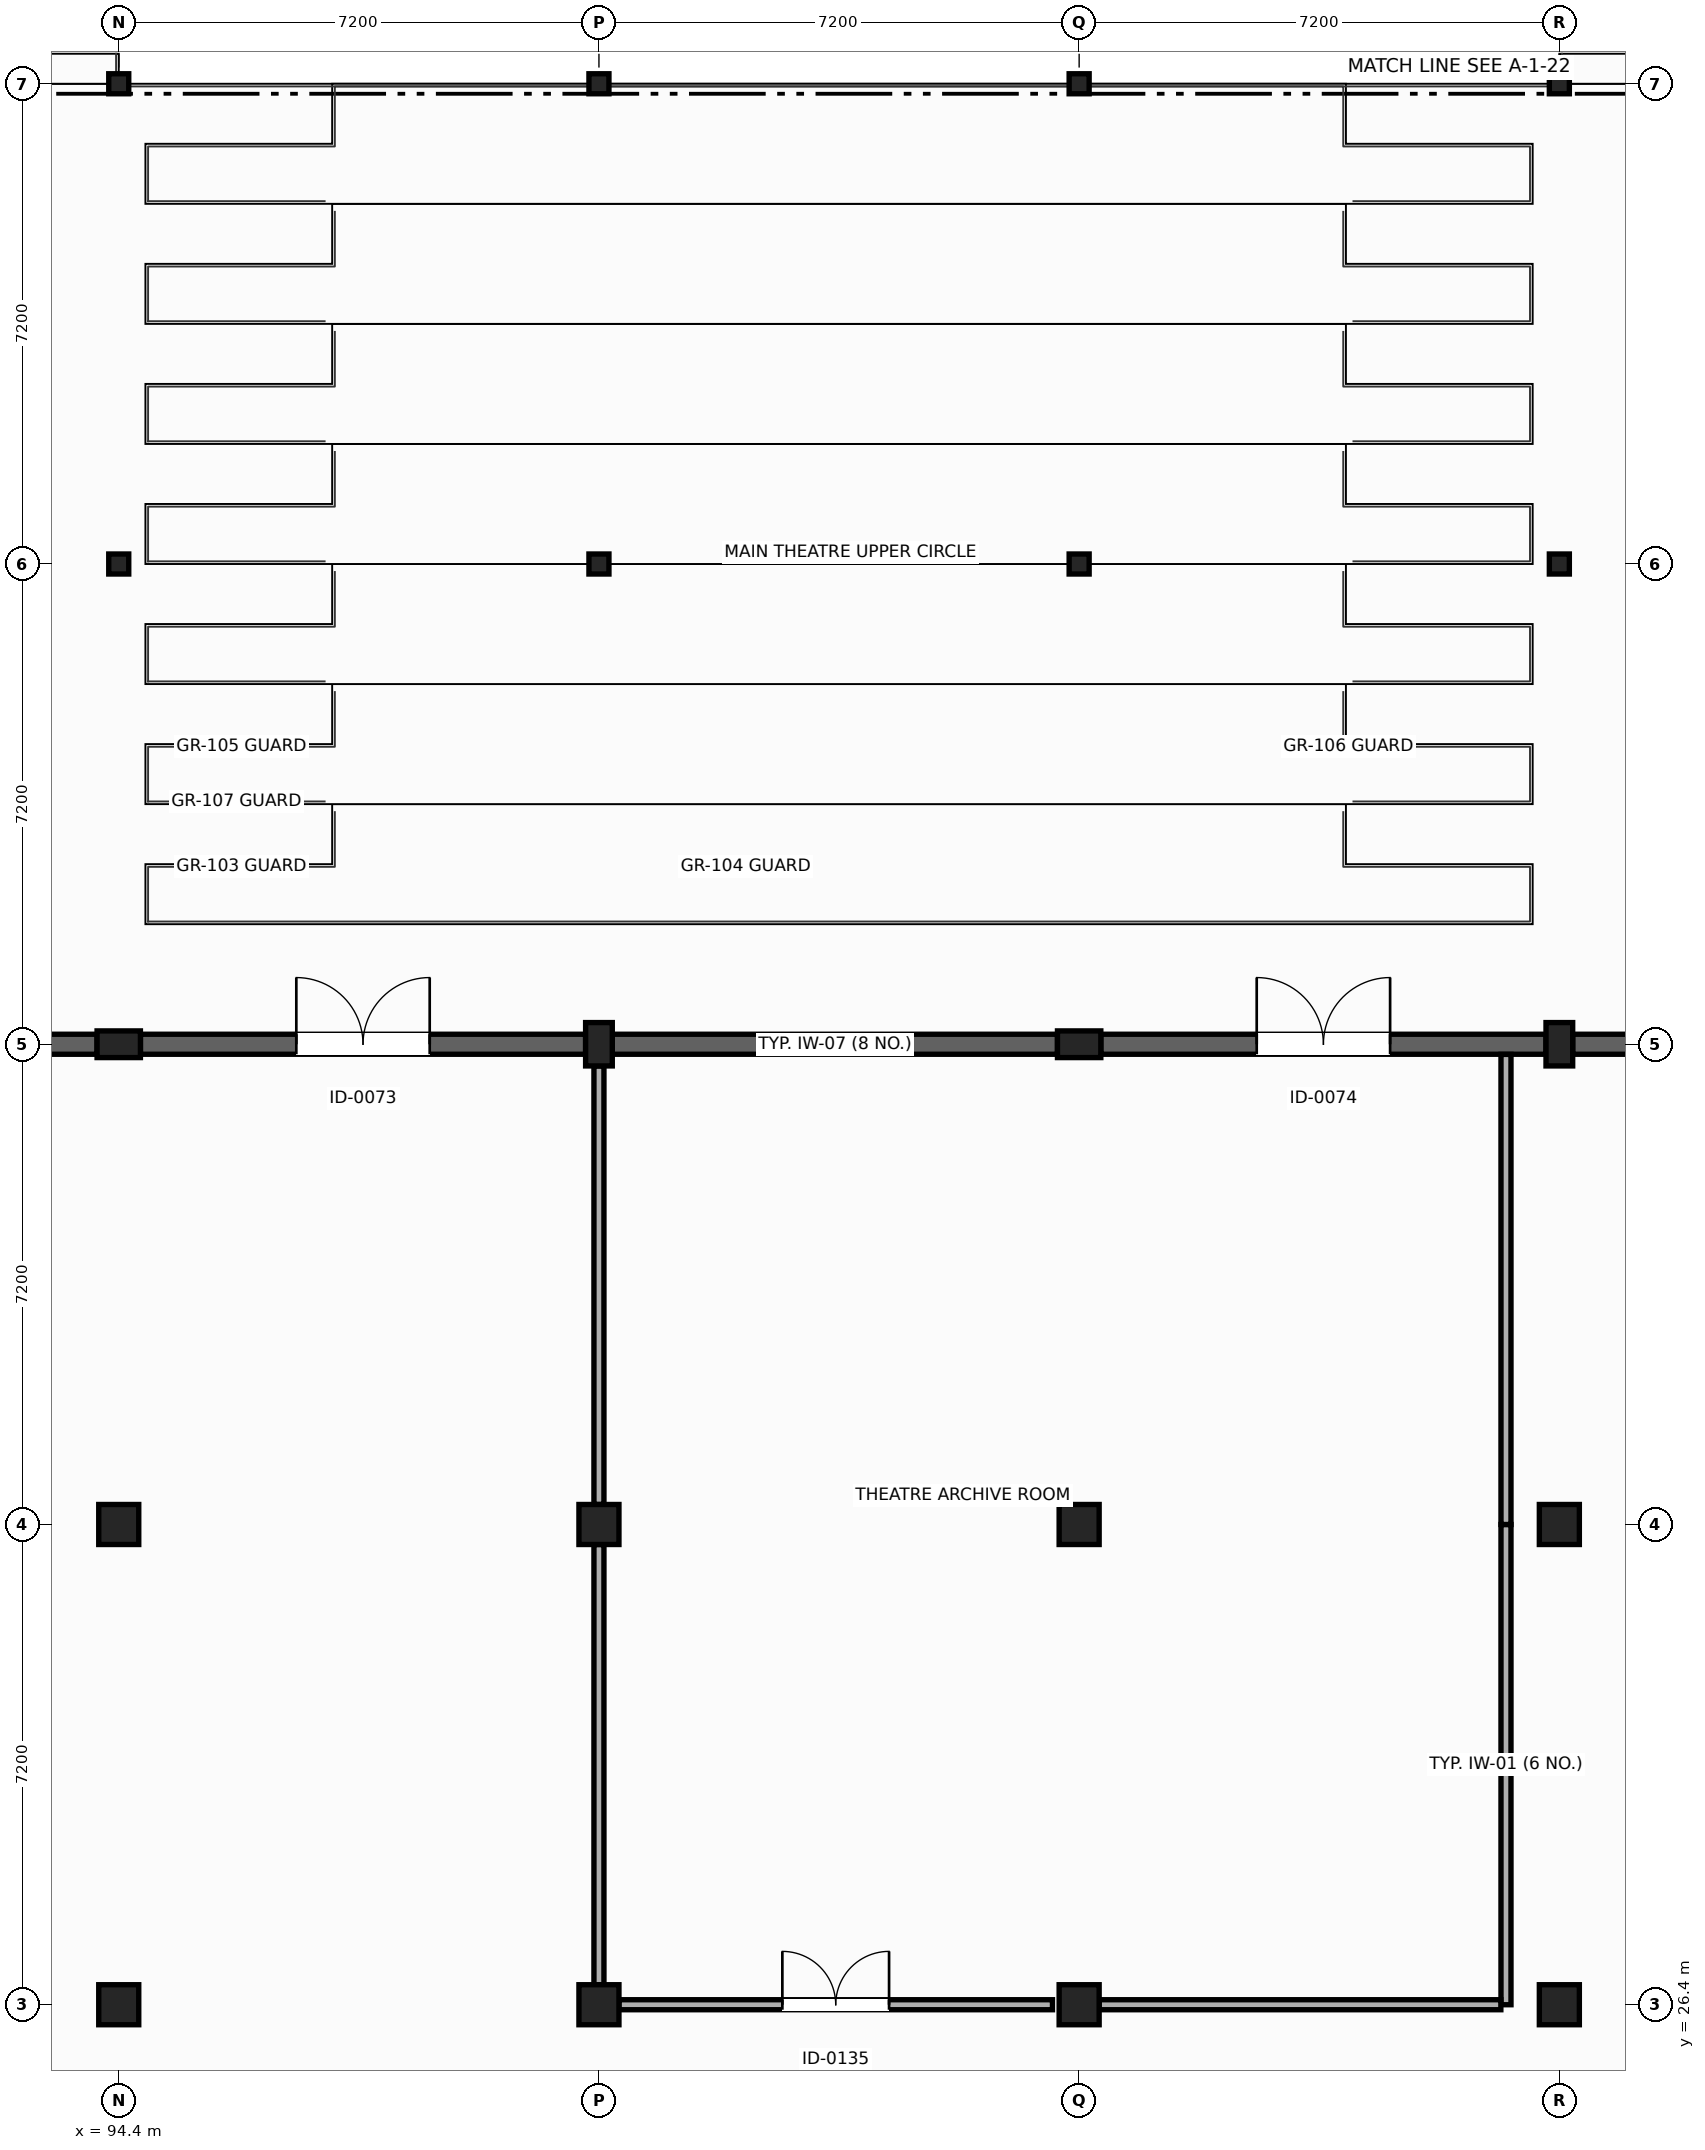
"""IFC4 building model, lengths in metres.
Left out: names, types, materials, properties, quantities, classifications, styles, units other than length and angle.
Written with IfcOpenShell. Run it as: python <this file> out.ifc"""

import sys

from ifc_helpers import new_model, si_unit, direction, frame, frame_2d, origin, origin_2d, place, context, subcontext, project, spatial, rectangle, i_section, extrude, element, fill, save


model = new_model("IFC4")
c1 = context("Model", 3, precision=1e-05, world=origin(), true_north=direction((0.0, 1.0)))
c2 = subcontext(c1, "Body", "Model", "MODEL_VIEW")
j1 = project(units=[si_unit("LENGTHUNIT", "METRE"), si_unit("PLANEANGLEUNIT", "RADIAN")], contexts=[c1])
p1 = place(None, origin())
s1 = spatial("IfcSite", under=j1, at=p1, CompositionType="ELEMENT")
p2 = place(p1, origin())
s2 = spatial("IfcBuilding", under=s1, at=p2, CompositionType="ELEMENT")
p3 = place(p2, frame((0.0, 0.0, 9.9)))
s3 = spatial("IfcBuildingStorey", under=s2, at=p3, CompositionType="ELEMENT", Elevation=9.9)
p4 = place(p3, frame((94.4, 48.0, 0.0), z_axis=(0.0, 0.0, 1.0), x_axis=(1.0, 0.0, 0.0)))
e1 = element("IfcColumn", 1, at=p4, inside=s3, PredefinedType="COLUMN", context=c2, shape_type="SweptSolid", body=[
    extrude(i_section(OverallWidth=0.3, OverallDepth=0.3, WebThickness=0.011, FlangeThickness=0.019, at=origin_2d()), origin(), (0.0, 0.0, 1.0), 1.145),
])
p5 = place(p3, frame((94.4, 55.2, 0.0), z_axis=(0.0, 0.0, 1.0), x_axis=(1.0, 0.0, 0.0)))
e2 = element("IfcColumn", 2, at=p5, inside=s3, PredefinedType="COLUMN", context=c2, shape_type="SweptSolid", body=[
    extrude(i_section(OverallWidth=0.3, OverallDepth=0.3, WebThickness=0.011, FlangeThickness=0.019, at=origin_2d()), origin(), (0.0, 0.0, 1.0), 1.945),
])
p6 = place(p3, frame((101.6, 48.0, 0.0), z_axis=(0.0, 0.0, 1.0), x_axis=(1.0, 0.0, 0.0)))
e3 = element("IfcColumn", 3, at=p6, inside=s3, PredefinedType="COLUMN", context=c2, shape_type="SweptSolid", body=[
    extrude(i_section(OverallWidth=0.3, OverallDepth=0.3, WebThickness=0.011, FlangeThickness=0.019, at=origin_2d()), origin(), (0.0, 0.0, 1.0), 1.145),
])
p7 = place(p3, frame((101.6, 55.2, 0.0), z_axis=(0.0, 0.0, 1.0), x_axis=(1.0, 0.0, 0.0)))
e4 = element("IfcColumn", 4, at=p7, inside=s3, PredefinedType="COLUMN", context=c2, shape_type="SweptSolid", body=[
    extrude(i_section(OverallWidth=0.3, OverallDepth=0.3, WebThickness=0.011, FlangeThickness=0.019, at=origin_2d()), origin(), (0.0, 0.0, 1.0), 1.945),
])
p8 = place(p3, frame((108.8, 48.0, 0.0), z_axis=(0.0, 0.0, 1.0), x_axis=(1.0, 0.0, 0.0)))
e5 = element("IfcColumn", 5, at=p8, inside=s3, PredefinedType="COLUMN", context=c2, shape_type="SweptSolid", body=[
    extrude(i_section(OverallWidth=0.3, OverallDepth=0.3, WebThickness=0.011, FlangeThickness=0.019, at=origin_2d()), origin(), (0.0, 0.0, 1.0), 1.145),
])
p9 = place(p3, frame((108.8, 55.2, 0.0), z_axis=(0.0, 0.0, 1.0), x_axis=(1.0, 0.0, 0.0)))
e6 = element("IfcColumn", 6, at=p9, inside=s3, PredefinedType="COLUMN", context=c2, shape_type="SweptSolid", body=[
    extrude(i_section(OverallWidth=0.3, OverallDepth=0.3, WebThickness=0.011, FlangeThickness=0.019, at=origin_2d()), origin(), (0.0, 0.0, 1.0), 1.945),
])
p10 = place(p3, frame((116.0, 48.0, 0.0), z_axis=(0.0, 0.0, 1.0), x_axis=(1.0, 0.0, 0.0)))
e7 = element("IfcColumn", 7, at=p10, inside=s3, PredefinedType="COLUMN", context=c2, shape_type="SweptSolid", body=[
    extrude(i_section(OverallWidth=0.3, OverallDepth=0.3, WebThickness=0.011, FlangeThickness=0.019, at=origin_2d()), origin(), (0.0, 0.0, 1.0), 1.145),
])
p11 = place(p3, frame((116.0, 55.2, 0.0), z_axis=(0.0, 0.0, 1.0), x_axis=(1.0, 0.0, 0.0)))
e8 = element("IfcColumn", 8, at=p11, inside=s3, PredefinedType="COLUMN", context=c2, shape_type="SweptSolid", body=[
    extrude(i_section(OverallWidth=0.3, OverallDepth=0.3, WebThickness=0.011, FlangeThickness=0.019, at=origin_2d()), origin(), (0.0, 0.0, 1.0), 1.945),
])
for number, where, z_axis, x_axis in (
    (9, (94.4, 26.4, 0.0), (0.0, 0.0, 1.0), (1.0, 0.0, 0.0)),
    (10, (101.6, 26.4, 0.0), (0.0, 0.0, 1.0), (1.0, 0.0, 0.0)),
    (11, (108.8, 26.4, 0.0), (0.0, 0.0, 1.0), (0.0, 1.0, 0.0)),
    (12, (116.0, 26.4, 0.0), (0.0, 0.0, 1.0), (1.0, 0.0, 0.0)),
    (13, (94.4, 33.6, 0.0), (0.0, 0.0, 1.0), (1.0, 0.0, 0.0)),
    (14, (101.6, 33.6, 0.0), (0.0, 0.0, 1.0), (0.0, 1.0, 0.0)),
    (15, (108.8, 33.6, 0.0), (0.0, 0.0, 1.0), (1.0, 0.0, 0.0)),
    (16, (116.0, 33.6, 0.0), (0.0, 0.0, 1.0), (0.0, 1.0, 0.0)),
):
    element("IfcColumn", number, at=place(p3, frame(where, z_axis=z_axis, x_axis=x_axis)), inside=s3, PredefinedType="COLUMN", context=c2, shape_type="SweptSolid", body=[
        extrude(rectangle(XDim=0.6, YDim=0.6, at=origin_2d()), origin(), (0.0, 0.0, 1.0), 4.5),
    ])
for number, where, z_axis, x_axis in (
    (17, (94.4, 40.8, 0.0), (0.0, 0.0, 1.0), (0.0, 1.0, 0.0)),
    (18, (101.6, 40.8, 0.0), (0.0, 0.0, 1.0), (1.0, 0.0, 0.0)),
    (19, (108.8, 40.8, 0.0), (0.0, 0.0, 1.0), (0.0, 1.0, 0.0)),
    (20, (116.0, 40.8, 0.0), (0.0, 0.0, 1.0), (1.0, 0.0, 0.0)),
):
    element("IfcColumn", number, at=place(p3, frame(where, z_axis=z_axis, x_axis=x_axis)), inside=s3, PredefinedType="PILASTER", context=c2, shape_type="SweptSolid", body=[
        extrude(rectangle(XDim=0.4, YDim=0.65, at=origin_2d()), origin(), (0.0, 0.0, 1.0), 4.5),
    ])
p12 = place(p3, frame((87.4, 40.8, 0.0), z_axis=(0.0, 0.0, 1.0), x_axis=(1.0, 0.0, 0.0)))
e21 = element("IfcWall", 21, at=p12, inside=s3, PredefinedType="SHEAR", context=c2, shape_type="SweptSolid", body=[
    extrude(rectangle(XDim=6.675, YDim=0.3, at=frame_2d((3.337, 0.0))), origin(), (0.0, 0.0, 1.0), 4.22),
])
p13 = place(p12, frame((2.438, 0.0, 0.0)))
e22 = element("IfcOpeningElement", 22, at=p13, cuts=e21, PredefinedType="OPENING", context=c2, shape_type="SweptSolid", body=[
    extrude(rectangle(XDim=1.8, YDim=2.3, at=frame_2d((0.9, 1.15))), frame((0.0, 0.16, 0.0), z_axis=(0.0, -1.0, 0.0), x_axis=(1.0, 0.0, 0.0)), (0.0, 0.0, 1.0), 0.32),
])
p14 = place(p3, frame((94.725, 40.8, 0.0), z_axis=(0.0, 0.0, 1.0), x_axis=(1.0, 0.0, 0.0)))
e23 = element("IfcWall", 23, at=p14, inside=s3, PredefinedType="SHEAR", context=c2, shape_type="SweptSolid", body=[
    extrude(rectangle(XDim=6.675, YDim=0.3, at=frame_2d((3.337, 0.0))), origin(), (0.0, 0.0, 1.0), 4.22),
])
p15 = place(p14, frame((2.337, 0.0, 0.0)))
e24 = element("IfcOpeningElement", 24, at=p15, cuts=e23, PredefinedType="OPENING", context=c2, shape_type="SweptSolid", body=[
    extrude(rectangle(XDim=2.0, YDim=2.35, at=frame_2d((1.0, 1.175))), frame((0.0, 0.16, 0.0), z_axis=(0.0, -1.0, 0.0), x_axis=(1.0, 0.0, 0.0)), (0.0, 0.0, 1.0), 0.32),
])
p16 = place(p3, frame((101.8, 40.8, 0.0), z_axis=(0.0, 0.0, 1.0), x_axis=(1.0, 0.0, 0.0)))
e25 = element("IfcWall", 25, at=p16, inside=s3, PredefinedType="SHEAR", context=c2, shape_type="SweptSolid", body=[
    extrude(rectangle(XDim=6.675, YDim=0.3, at=frame_2d((3.337, 0.0))), origin(), (0.0, 0.0, 1.0), 4.22),
])
p17 = place(p3, frame((109.125, 40.8, 0.0), z_axis=(0.0, 0.0, 1.0), x_axis=(1.0, 0.0, 0.0)))
e26 = element("IfcWall", 26, at=p17, inside=s3, PredefinedType="SHEAR", context=c2, shape_type="SweptSolid", body=[
    extrude(rectangle(XDim=6.675, YDim=0.3, at=frame_2d((3.337, 0.0))), origin(), (0.0, 0.0, 1.0), 4.22),
])
p18 = place(p17, frame((2.337, 0.0, 0.0)))
e27 = element("IfcOpeningElement", 27, at=p18, cuts=e26, PredefinedType="OPENING", context=c2, shape_type="SweptSolid", body=[
    extrude(rectangle(XDim=2.0, YDim=2.35, at=frame_2d((1.0, 1.175))), frame((0.0, 0.16, 0.0), z_axis=(0.0, -1.0, 0.0), x_axis=(1.0, 0.0, 0.0)), (0.0, 0.0, 1.0), 0.32),
])
p19 = place(p3, frame((116.2, 40.8, 0.0), z_axis=(0.0, 0.0, 1.0), x_axis=(1.0, 0.0, 0.0)))
e28 = element("IfcWall", 28, at=p19, inside=s3, PredefinedType="SHEAR", context=c2, shape_type="SweptSolid", body=[
    extrude(rectangle(XDim=6.8, YDim=0.3, at=frame_2d((3.4, 0.0))), origin(), (0.0, 0.0, 1.0), 4.22),
])
p20 = place(p19, frame((2.5, 0.0, 0.0)))
e29 = element("IfcOpeningElement", 29, at=p20, cuts=e28, PredefinedType="OPENING", context=c2, shape_type="SweptSolid", body=[
    extrude(rectangle(XDim=1.8, YDim=2.3, at=frame_2d((0.9, 1.15))), frame((0.0, 0.16, 0.0), z_axis=(0.0, -1.0, 0.0), x_axis=(1.0, 0.0, 0.0)), (0.0, 0.0, 1.0), 0.32),
])
p21 = place(p3, frame((115.2, 26.4, 0.0), z_axis=(0.0, 0.0, 1.0), x_axis=(0.0, 1.0, 0.0)))
e30 = element("IfcWall", 30, at=p21, inside=s3, PredefinedType="PARTITIONING", context=c2, shape_type="SweptSolid", body=[
    extrude(rectangle(XDim=7.2, YDim=0.15, at=frame_2d((3.6, 0.0))), origin(), (0.0, 0.0, 1.0), 3.715),
])
p22 = place(p3, frame((115.2, 33.6, 0.0), z_axis=(0.0, 0.0, 1.0), x_axis=(0.0, 1.0, 0.0)))
e31 = element("IfcWall", 31, at=p22, inside=s3, PredefinedType="PARTITIONING", context=c2, shape_type="SweptSolid", body=[
    extrude(rectangle(XDim=7.048, YDim=0.15, at=frame_2d((3.524, 0.0))), origin(), (0.0, 0.0, 1.0), 3.715),
])
p23 = place(p3, frame((101.6, 40.475, 0.0), z_axis=(0.0, 0.0, 1.0), x_axis=(0.0, -1.0, 0.0)))
e32 = element("IfcWall", 32, at=p23, inside=s3, PredefinedType="PARTITIONING", context=c2, shape_type="SweptSolid", body=[
    extrude(rectangle(XDim=6.575, YDim=0.15, at=frame_2d((3.288, 0.0))), origin(), (0.0, 0.0, 1.0), 3.515),
])
p24 = place(p3, frame((101.6, 33.3, 0.0), z_axis=(0.0, 0.0, 1.0), x_axis=(0.0, -1.0, 0.0)))
e33 = element("IfcWall", 33, at=p24, inside=s3, PredefinedType="PARTITIONING", context=c2, shape_type="SweptSolid", body=[
    extrude(rectangle(XDim=6.6, YDim=0.15, at=frame_2d((3.3, 0.0))), origin(), (0.0, 0.0, 1.0), 3.515),
])
p25 = place(p3, frame((101.9, 26.4, 0.0), z_axis=(0.0, 0.0, 1.0), x_axis=(1.0, 0.0, 0.0)))
e34 = element("IfcWall", 34, at=p25, inside=s3, PredefinedType="PARTITIONING", context=c2, shape_type="SweptSolid", body=[
    extrude(rectangle(XDim=6.5, YDim=0.15, at=frame_2d((3.25, 0.0))), origin(), (0.0, 0.0, 1.0), 3.715),
])
p26 = place(p25, frame((2.45, 0.0, 0.0)))
e35 = element("IfcOpeningElement", 35, at=p26, cuts=e34, PredefinedType="OPENING", context=c2, shape_type="SweptSolid", body=[
    extrude(rectangle(XDim=1.6, YDim=2.25, at=frame_2d((0.8, 1.125))), frame((0.0, 0.085, 0.0), z_axis=(0.0, -1.0, 0.0), x_axis=(1.0, 0.0, 0.0)), (0.0, 0.0, 1.0), 0.17),
])
p27 = place(p3, frame((109.1, 26.4, 0.0), z_axis=(0.0, 0.0, 1.0), x_axis=(1.0, 0.0, 0.0)))
e36 = element("IfcWall", 36, at=p27, inside=s3, PredefinedType="PARTITIONING", context=c2, shape_type="SweptSolid", body=[
    extrude(rectangle(XDim=6.023, YDim=0.15, at=frame_2d((3.011, 0.0))), origin(), (0.0, 0.0, 1.0), 3.715),
])
p28 = place(p15, origin())
e37 = element("IfcDoor", 37, at=p28, inside=s3, OperationType="DOUBLE_DOOR_SINGLE_SWING", PredefinedType="DOOR", context=c2, shape_type="SweptSolid", body=[
    extrude(rectangle(XDim=2.0, YDim=2.35, at=frame_2d((1.0, 1.175))), frame((0.0, 0.025, 0.0), z_axis=(0.0, -1.0, 0.0), x_axis=(1.0, 0.0, 0.0)), (0.0, 0.0, 1.0), 0.05),
])
fill(e24, e37)
p29 = place(p18, origin())
e38 = element("IfcDoor", 38, at=p29, inside=s3, OperationType="DOUBLE_DOOR_SINGLE_SWING", PredefinedType="DOOR", context=c2, shape_type="SweptSolid", body=[
    extrude(rectangle(XDim=2.0, YDim=2.35, at=frame_2d((1.0, 1.175))), frame((0.0, 0.025, 0.0), z_axis=(0.0, -1.0, 0.0), x_axis=(1.0, 0.0, 0.0)), (0.0, 0.0, 1.0), 0.05),
])
fill(e27, e38)
p30 = place(p26, origin())
e39 = element("IfcDoor", 39, at=p30, inside=s3, OperationType="DOUBLE_DOOR_SINGLE_SWING", PredefinedType="DOOR", context=c2, shape_type="SweptSolid", body=[
    extrude(rectangle(XDim=1.6, YDim=2.25, at=frame_2d((0.8, 1.125))), frame((0.0, 0.025, 0.0), z_axis=(0.0, -1.0, 0.0), x_axis=(1.0, 0.0, 0.0)), (0.0, 0.0, 1.0), 0.05),
])
fill(e35, e39)
save(model, sys.argv[1])
